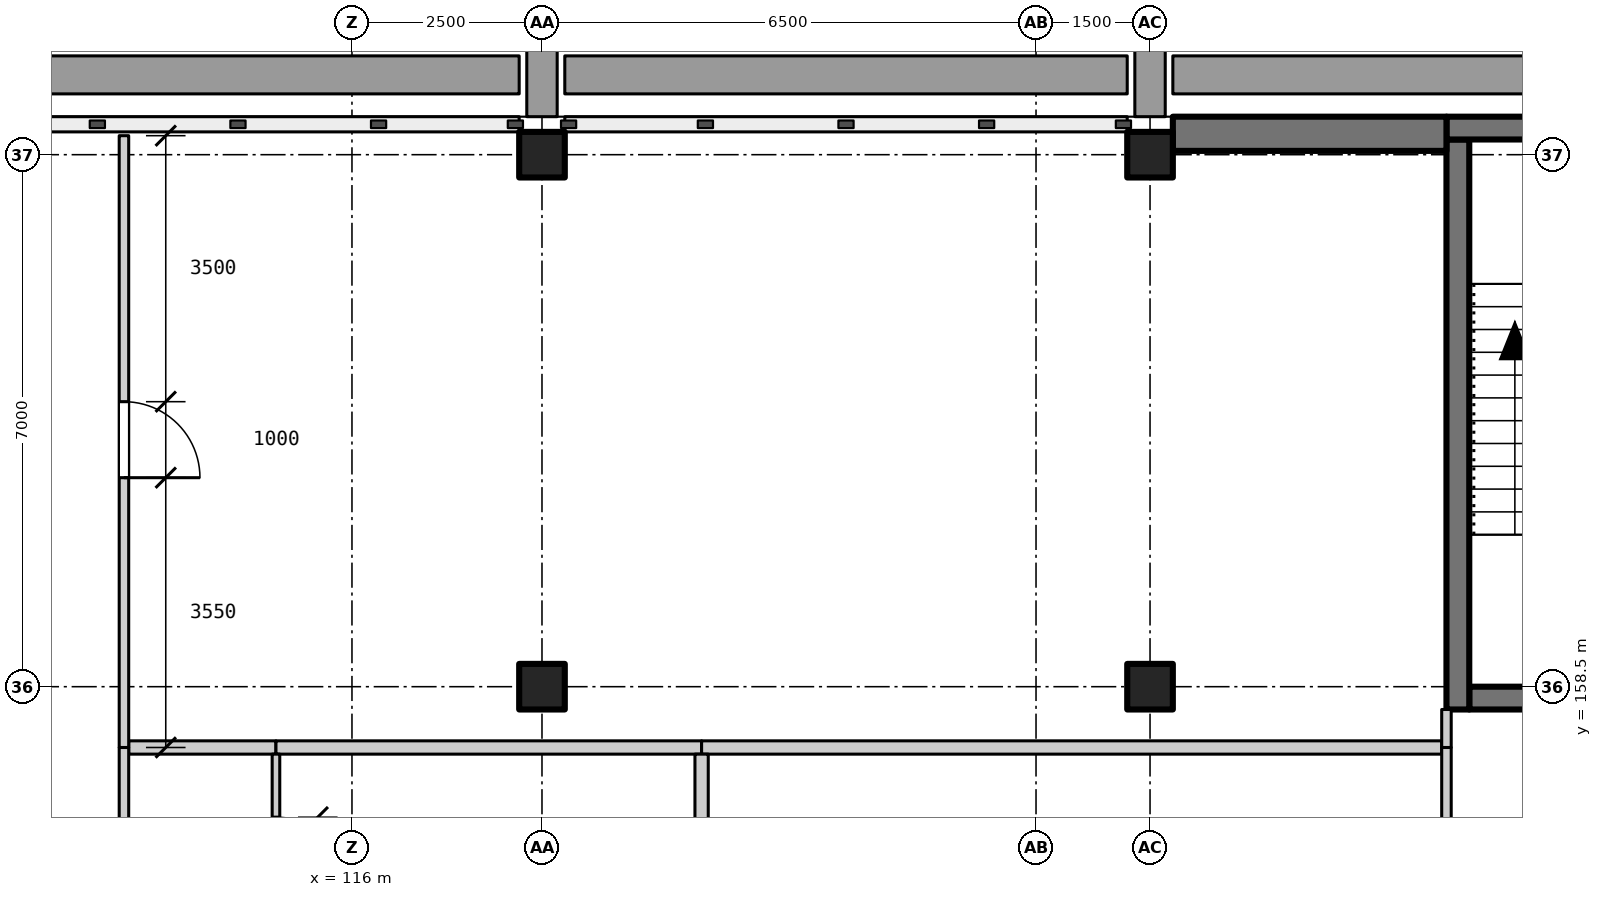
"""IFC4 building model, lengths in metres.
Left out: names, types, materials, properties, quantities, classifications, styles, units other than length and angle.
Written with IfcOpenShell. Run it as: python <this file> out.ifc"""

import sys

from ifc_helpers import new_model, si_unit, direction, frame, frame_2d, origin, origin_2d, place, context, subcontext, project, spatial, rectangle, extrude, element, fill, save


model = new_model("IFC4")
c1 = context("Model", 3, precision=1e-05, world=origin(), true_north=direction((0.0, 1.0)))
c2 = subcontext(c1, "Body", "Model", "MODEL_VIEW")
j1 = project(units=[si_unit("LENGTHUNIT", "METRE"), si_unit("PLANEANGLEUNIT", "RADIAN")], contexts=[c1])
p1 = place(None, origin())
s1 = spatial("IfcSite", under=j1, at=p1, CompositionType="ELEMENT")
p2 = place(p1, origin())
s2 = spatial("IfcBuilding", under=s1, at=p2, CompositionType="ELEMENT")
p3 = place(p2, frame((0.0, 0.0, 14.4)))
s3 = spatial("IfcBuildingStorey", under=s2, at=p3, CompositionType="ELEMENT", Elevation=14.4)
for number, where, z_axis, x_axis in (
    (1, (118.5, 158.5, 0.0), (0.0, 0.0, 1.0), (1.0, 0.0, 0.0)),
    (2, (118.5, 165.5, 0.0), (0.0, 0.0, 1.0), (1.0, 0.0, 0.0)),
    (3, (126.5, 158.5, 0.0), (0.0, 0.0, 1.0), (1.0, 0.0, 0.0)),
    (4, (126.5, 165.5, 0.0), (0.0, 0.0, 1.0), (1.0, 0.0, 0.0)),
):
    element("IfcColumn", number, at=place(p3, frame(where, z_axis=z_axis, x_axis=x_axis)), inside=s3, PredefinedType="COLUMN", context=c2, shape_type="SweptSolid", body=[
        extrude(rectangle(XDim=0.6, YDim=0.6, at=origin_2d()), origin(), (0.0, 0.0, 1.0), 3.9),
    ])
p4 = place(p3, frame((130.7, 158.35, 0.0), z_axis=(0.0, 0.0, 1.0), x_axis=(1.0, 0.0, 0.0)))
e5 = element("IfcWall", 5, at=p4, inside=s3, PredefinedType="SHEAR", context=c2, shape_type="SweptSolid", body=[
    extrude(rectangle(XDim=3.0, YDim=0.3, at=frame_2d((1.5, 0.0))), origin(), (0.0, 0.0, 1.0), 3.9),
])
p5 = place(p4, frame((0.95, 0.0, 0.0)))
e6 = element("IfcOpeningElement", 6, at=p5, cuts=e5, PredefinedType="OPENING", context=c2, shape_type="SweptSolid", body=[
    extrude(rectangle(XDim=1.1, YDim=2.1, at=frame_2d((0.55, 1.05))), frame((0.0, 0.16, 0.0), z_axis=(0.0, -1.0, 0.0), x_axis=(1.0, 0.0, 0.0)), (0.0, 0.0, 1.0), 0.32),
])
p6 = place(p3, frame((130.55, 158.2, 0.0), z_axis=(0.0, 0.0, 1.0), x_axis=(0.0, 1.0, 0.0)))
e7 = element("IfcWall", 7, at=p6, inside=s3, PredefinedType="SHEAR", context=c2, shape_type="SweptSolid", body=[
    extrude(rectangle(XDim=7.5, YDim=0.3, at=frame_2d((3.75, 0.0))), origin(), (0.0, 0.0, 1.0), 3.9),
])
p7 = place(p3, frame((86.0, 165.875, 4.2), z_axis=(0.0, 0.0, 1.0), x_axis=(1.0, 0.0, 0.0)))
e8 = element("IfcWall", 8, at=p7, inside=s3, PredefinedType="PARAPET", context=c2, shape_type="SweptSolid", body=[
    extrude(rectangle(XDim=48.0, YDim=0.25, at=frame_2d((24.0, 0.0))), origin(), (0.0, 0.0, 1.0), 1.1),
])
p8 = place(p3, frame((130.4, 165.85, 0.0), z_axis=(0.0, 0.0, 1.0), x_axis=(1.0, 0.0, 0.0)))
e9 = element("IfcWall", 9, at=p8, inside=s3, PredefinedType="SOLIDWALL", context=c2, shape_type="SweptSolid", body=[
    extrude(rectangle(XDim=3.6, YDim=0.3, at=frame_2d((1.8, 0.0))), origin(), (0.0, 0.0, 1.0), 3.9),
])
p9 = place(p3, frame((126.8, 165.775, 0.0), z_axis=(0.0, 0.0, 1.0), x_axis=(1.0, 0.0, 0.0)))
e10 = element("IfcWall", 10, at=p9, inside=s3, PredefinedType="SOLIDWALL", context=c2, shape_type="SweptSolid", body=[
    extrude(rectangle(XDim=3.6, YDim=0.45, at=frame_2d((1.8, 0.0))), origin(), (0.0, 0.0, 1.0), 3.0),
])
p10 = place(p3, frame((113.062, 157.7, 0.0), z_axis=(0.0, 0.0, 1.0), x_axis=(1.0, 0.0, 0.0)))
e11 = element("IfcWall", 11, at=p10, inside=s3, PredefinedType="PARTITIONING", context=c2, shape_type="SweptSolid", body=[
    extrude(rectangle(XDim=1.938, YDim=0.175, at=frame_2d((0.969, 0.0))), origin(), (0.0, 0.0, 1.0), 3.9),
])
p11 = place(p3, frame((115.0, 157.7, 0.0), z_axis=(0.0, 0.0, 1.0), x_axis=(1.0, 0.0, 0.0)))
e12 = element("IfcWall", 12, at=p11, inside=s3, PredefinedType="PARTITIONING", context=c2, shape_type="SweptSolid", body=[
    extrude(rectangle(XDim=5.6, YDim=0.175, at=frame_2d((2.8, 0.0))), origin(), (0.0, 0.0, 1.0), 3.9),
])
p12 = place(p3, frame((120.6, 157.7, 0.0), z_axis=(0.0, 0.0, 1.0), x_axis=(1.0, 0.0, 0.0)))
e13 = element("IfcWall", 13, at=p12, inside=s3, PredefinedType="PARTITIONING", context=c2, shape_type="SweptSolid", body=[
    extrude(rectangle(XDim=9.737, YDim=0.175, at=frame_2d((4.869, 0.0))), origin(), (0.0, 0.0, 1.0), 3.9),
])
p13 = place(p3, frame((113.0, 149.41, 0.0), z_axis=(0.0, 0.0, 1.0), x_axis=(0.0, 1.0, 0.0)))
e14 = element("IfcWall", 14, at=p13, inside=s3, PredefinedType="PARTITIONING", context=c2, shape_type="SweptSolid", body=[
    extrude(rectangle(XDim=8.29, YDim=0.125, at=frame_2d((4.145, 0.0))), origin(), (0.0, 0.0, 1.0), 3.9),
])
p14 = place(p3, frame((113.0, 157.7, 0.0), z_axis=(0.0, 0.0, 1.0), x_axis=(0.0, 1.0, 0.0)))
e15 = element("IfcWall", 15, at=p14, inside=s3, PredefinedType="PARTITIONING", context=c2, shape_type="SweptSolid", body=[
    extrude(rectangle(XDim=8.05, YDim=0.125, at=frame_2d((4.025, 0.0))), origin(), (0.0, 0.0, 1.0), 3.9),
])
p15 = place(p14, frame((3.55, 0.0, 0.0)))
e16 = element("IfcOpeningElement", 16, at=p15, cuts=e15, PredefinedType="OPENING", context=c2, shape_type="SweptSolid", body=[
    extrude(rectangle(XDim=1.0, YDim=2.1, at=frame_2d((0.5, 1.05))), frame((0.0, 0.073, 0.0), z_axis=(0.0, -1.0, 0.0), x_axis=(1.0, 0.0, 0.0)), (0.0, 0.0, 1.0), 0.145),
])
p16 = place(p3, frame((115.0, 154.933, 0.0), z_axis=(0.0, 0.0, 1.0), x_axis=(0.0, 1.0, 0.0)))
e17 = element("IfcWall", 17, at=p16, inside=s3, PredefinedType="PARTITIONING", context=c2, shape_type="SweptSolid", body=[
    extrude(rectangle(XDim=2.679, YDim=0.1, at=frame_2d((1.34, 0.0))), origin(), (0.0, 0.0, 1.0), 3.9),
])
p17 = place(p16, frame((0.85, 0.0, 0.0)))
e18 = element("IfcOpeningElement", 18, at=p17, cuts=e17, PredefinedType="OPENING", context=c2, shape_type="SweptSolid", body=[
    extrude(rectangle(XDim=1.0, YDim=2.1, at=frame_2d((0.5, 1.05))), frame((0.0, 0.06, 0.0), z_axis=(0.0, -1.0, 0.0), x_axis=(1.0, 0.0, 0.0)), (0.0, 0.0, 1.0), 0.12),
])
p18 = place(p3, frame((120.6, 154.933, 0.0), z_axis=(0.0, 0.0, 1.0), x_axis=(0.0, 1.0, 0.0)))
e19 = element("IfcWall", 19, at=p18, inside=s3, PredefinedType="PARTITIONING", context=c2, shape_type="SweptSolid", body=[
    extrude(rectangle(XDim=2.679, YDim=0.175, at=frame_2d((1.34, 0.0))), origin(), (0.0, 0.0, 1.0), 3.9),
])
p19 = place(p3, frame((130.4, 149.41, 0.0), z_axis=(0.0, 0.0, 1.0), x_axis=(0.0, 1.0, 0.0)))
e20 = element("IfcWall", 20, at=p19, inside=s3, PredefinedType="PARTITIONING", context=c2, shape_type="SweptSolid", body=[
    extrude(rectangle(XDim=8.29, YDim=0.125, at=frame_2d((4.145, 0.0))), origin(), (0.0, 0.0, 1.0), 3.9),
])
p20 = place(p3, frame((130.4, 157.7, 0.0), z_axis=(0.0, 0.0, 1.0), x_axis=(0.0, 1.0, 0.0)))
e21 = element("IfcWall", 21, at=p20, inside=s3, PredefinedType="PARTITIONING", context=c2, shape_type="SweptSolid", body=[
    extrude(rectangle(XDim=0.5, YDim=0.125, at=frame_2d((0.25, 0.0))), origin(), (0.0, 0.0, 1.0), 3.9),
])
p21 = place(p15, frame((1.0, 0.0, 0.0), z_axis=(0.0, 0.0, 1.0), x_axis=(-1.0, 0.0, 0.0)))
e22 = element("IfcDoor", 22, at=p21, inside=s3, OperationType="SINGLE_SWING_RIGHT", PredefinedType="DOOR", context=c2, shape_type="SweptSolid", body=[
    extrude(rectangle(XDim=1.0, YDim=2.1, at=frame_2d((0.5, 1.05))), frame((0.0, 0.025, 0.0), z_axis=(0.0, -1.0, 0.0), x_axis=(1.0, 0.0, 0.0)), (0.0, 0.0, 1.0), 0.05),
])
fill(e16, e22)
save(model, sys.argv[1])
